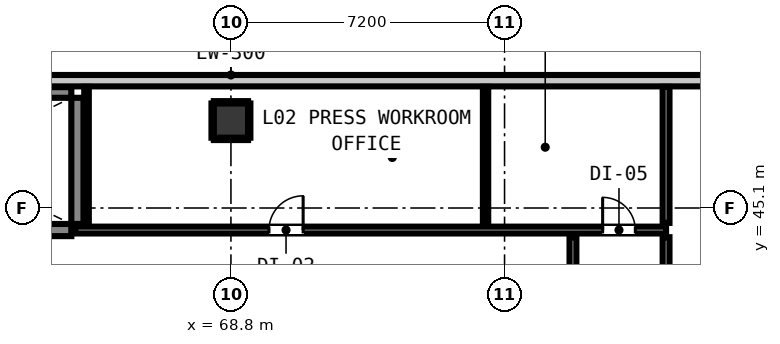
"""IFC4 building model, lengths in metres.
Left out: names, types, materials, properties, quantities, classifications, styles, units other than length and angle.
Written with IfcOpenShell. Run it as: python <this file> out.ifc"""

import sys

from ifc_helpers import new_model, si_unit, direction, frame, frame_2d, origin, origin_2d, place, context, subcontext, project, spatial, rectangle, circle, extrude, element, fill, save


model = new_model("IFC4")
c1 = context("Model", 3, precision=1e-05, world=origin(), true_north=direction((0.0, 1.0)))
c2 = subcontext(c1, "Body", "Model", "MODEL_VIEW")
j1 = project(units=[si_unit("LENGTHUNIT", "METRE"), si_unit("PLANEANGLEUNIT", "RADIAN")], contexts=[c1])
p1 = place(None, origin())
s1 = spatial("IfcSite", under=j1, at=p1, CompositionType="ELEMENT")
p2 = place(p1, origin())
s2 = spatial("IfcBuilding", under=s1, at=p2, CompositionType="ELEMENT")
p3 = place(p2, frame((0.0, 0.0, 9.4)))
s3 = spatial("IfcBuildingStorey", under=s2, at=p3, CompositionType="ELEMENT", Elevation=9.4)
p4 = place(p3, frame((64.76, 44.68, 0.0), z_axis=(0.0, 0.0, 1.0), x_axis=(0.0, 1.0, 0.0)))
e1 = element("IfcWall", 1, at=p4, inside=s3, PredefinedType="SHEAR", context=c2, shape_type="SweptSolid", body=[
    extrude(rectangle(XDim=3.32, YDim=0.32, at=frame_2d((1.66, 0.0))), origin(), (0.0, 0.0, 1.0), 4.2),
])
p5 = place(p3, frame((56.2, 48.14, 0.0), z_axis=(0.0, 0.0, 1.0), x_axis=(1.0, 0.0, 0.0)))
e2 = element("IfcWall", 2, at=p5, inside=s3, PredefinedType="SHEAR", context=c2, shape_type="SweptSolid", body=[
    extrude(rectangle(XDim=8.4, YDim=0.28, at=frame_2d((4.2, 0.0))), origin(), (0.0, 0.0, 1.0), 4.2),
])
p6 = place(p3, frame((56.2, 44.52, 0.0), z_axis=(0.0, 0.0, 1.0), x_axis=(1.0, 0.0, 0.0)))
e3 = element("IfcWall", 3, at=p6, inside=s3, PredefinedType="SHEAR", context=c2, shape_type="SweptSolid", body=[
    extrude(rectangle(XDim=8.4, YDim=0.32, at=frame_2d((4.2, 0.0))), origin(), (0.0, 0.0, 1.0), 4.2),
])
p7 = place(p6, frame((0.23, 0.0, 0.0)))
e4 = element("IfcOpeningElement", 4, at=p7, cuts=e3, PredefinedType="OPENING", context=c2, shape_type="SweptSolid", body=[
    extrude(rectangle(XDim=1.1, YDim=2.15, at=frame_2d((0.55, 1.075))), frame((0.0, 0.17, 0.0), z_axis=(0.0, -1.0, 0.0), x_axis=(1.0, 0.0, 0.0)), (0.0, 0.0, 1.0), 0.34),
])
p8 = place(p3, frame((68.8, 47.4, 0.0), z_axis=(0.0, 0.0, 1.0), x_axis=(1.0, 0.0, 0.0)))
e5 = element("IfcColumn", 5, at=p8, inside=s3, PredefinedType="COLUMN", context=c2, shape_type="SweptSolid", body=[
    extrude(circle(Radius=0.45, at=origin_2d()), origin(), (0.0, 0.0, 1.0), 4.2),
])
p9 = place(p3, frame((54.55, 48.45, 0.0), z_axis=(0.0, 0.0, 1.0), x_axis=(1.0, 0.0, 0.0)))
e6 = element("IfcWall", 6, at=p9, inside=s3, PredefinedType="STANDARD", context=c2, shape_type="SweptSolid", body=[
    extrude(rectangle(XDim=28.5, YDim=0.3, at=frame_2d((14.25, 0.0))), origin(), (0.0, 0.0, 1.0), 3.92),
])
p10 = place(p3, frame((64.7, 44.52, 0.0), z_axis=(0.0, 0.0, 1.0), x_axis=(1.0, 0.0, 0.0)))
e7 = element("IfcWall", 7, at=p10, inside=s3, PredefinedType="PARTITIONING", context=c2, shape_type="SweptSolid", body=[
    extrude(rectangle(XDim=15.55, YDim=0.18, at=frame_2d((7.775, 0.0))), origin(), (0.0, 0.0, 1.0), 3.92),
])
p11 = place(p10, frame((5.1, 0.0, 0.0)))
e8 = element("IfcOpeningElement", 8, at=p11, cuts=e7, PredefinedType="OPENING", context=c2, shape_type="SweptSolid", body=[
    extrude(rectangle(XDim=0.9, YDim=2.1, at=frame_2d((0.45, 1.05))), frame((0.0, 0.1, 0.0), z_axis=(0.0, -1.0, 0.0), x_axis=(1.0, 0.0, 0.0)), (0.0, 0.0, 1.0), 0.2),
])
p12 = place(p10, frame((13.881, 0.0, 0.0)))
e9 = element("IfcOpeningElement", 9, at=p12, cuts=e7, PredefinedType="OPENING", context=c2, shape_type="SweptSolid", body=[
    extrude(rectangle(XDim=0.86, YDim=2.02, at=frame_2d((0.43, 1.01))), frame((0.0, 0.1, 0.0), z_axis=(0.0, -1.0, 0.0), x_axis=(1.0, 0.0, 0.0)), (0.0, 0.0, 1.0), 0.2),
])
p13 = place(p3, frame((77.8, 40.788, 0.0), z_axis=(0.0, 0.0, 1.0), x_axis=(0.0, 1.0, 0.0)))
e10 = element("IfcWall", 10, at=p13, inside=s3, PredefinedType="PARTITIONING", context=c2, shape_type="SweptSolid", body=[
    extrude(rectangle(XDim=3.544, YDim=0.18, at=frame_2d((1.772, 0.0))), origin(), (0.0, 0.0, 1.0), 3.92),
])
p14 = place(p13, frame((1.048, 0.0, 0.0)))
e11 = element("IfcOpeningElement", 11, at=p14, cuts=e10, PredefinedType="OPENING", context=c2, shape_type="SweptSolid", body=[
    extrude(rectangle(XDim=1.4, YDim=2.15, at=frame_2d((0.7, 1.075))), frame((0.0, 0.1, 0.0), z_axis=(0.0, -1.0, 0.0), x_axis=(1.0, 0.0, 0.0)), (0.0, 0.0, 1.0), 0.2),
])
p15 = place(p3, frame((80.25, 18.645, 0.0), z_axis=(0.0, 0.0, 1.0), x_axis=(0.0, 1.0, 0.0)))
e12 = element("IfcWall", 12, at=p15, inside=s3, PredefinedType="PARTITIONING", context=c2, shape_type="SweptSolid", body=[
    extrude(rectangle(XDim=25.687, YDim=0.18, at=frame_2d((12.844, 0.0))), origin(), (0.0, 0.0, 1.0), 3.92),
])
p16 = place(p3, frame((80.25, 44.708, 0.0), z_axis=(0.0, 0.0, 1.0), x_axis=(0.0, 1.0, 0.0)))
e13 = element("IfcWall", 13, at=p16, inside=s3, PredefinedType="PARTITIONING", context=c2, shape_type="SweptSolid", body=[
    extrude(rectangle(XDim=3.58, YDim=0.18, at=frame_2d((1.79, 0.0))), origin(), (0.0, 0.0, 1.0), 3.92),
])
p17 = place(p3, frame((75.5, 44.688, 0.0), z_axis=(0.0, 0.0, 1.0), x_axis=(0.0, 1.0, 0.0)))
e14 = element("IfcWall", 14, at=p17, inside=s3, PredefinedType="PARTITIONING", context=c2, shape_type="SweptSolid", body=[
    extrude(rectangle(XDim=3.6, YDim=0.14, at=frame_2d((1.8, 0.0))), origin(), (0.0, 0.0, 1.0), 3.92),
])
p18 = place(p3, frame((65.0, 44.678, 0.0), z_axis=(0.0, 0.0, 1.0), x_axis=(0.0, 1.0, 0.0)))
e15 = element("IfcWall", 15, at=p18, inside=s3, PredefinedType="PARTITIONING", context=c2, shape_type="SweptSolid", body=[
    extrude(rectangle(XDim=3.61, YDim=0.12, at=frame_2d((1.805, 0.0))), origin(), (0.0, 0.0, 1.0), 3.92),
])
for number, where, z_axis, x_axis in (
    (16, (68.35, 46.918, 0.0), (0.0, 0.0, 1.0), (1.0, 0.0, 0.0)),
    (17, (68.35, 47.882, 0.0), (0.0, 0.0, 1.0), (1.0, 0.0, 0.0)),
):
    element("IfcWall", number, at=place(p3, frame(where, z_axis=z_axis, x_axis=x_axis)), inside=s3, PredefinedType="PARTITIONING", context=c2, shape_type="SweptSolid", body=[
        extrude(rectangle(XDim=0.9, YDim=0.06, at=frame_2d((0.45, 0.0))), origin(), (0.0, 0.0, 1.0), 1.45),
    ])
for number, where, z_axis, x_axis in (
    (18, (68.318, 46.95, 0.0), (0.0, 0.0, 1.0), (0.0, 1.0, 0.0)),
    (19, (69.282, 46.95, 0.0), (0.0, 0.0, 1.0), (0.0, 1.0, 0.0)),
):
    element("IfcWall", number, at=place(p3, frame(where, z_axis=z_axis, x_axis=x_axis)), inside=s3, PredefinedType="PARTITIONING", context=c2, shape_type="SweptSolid", body=[
        extrude(rectangle(XDim=0.9, YDim=0.06, at=frame_2d((0.45, 0.0))), origin(), (0.0, 0.0, 1.0), 1.45),
    ])
p19 = place(p11, origin())
e20 = element("IfcDoor", 20, at=p19, inside=s3, OperationType="SINGLE_SWING_RIGHT", PredefinedType="DOOR", context=c2, shape_type="SweptSolid", body=[
    extrude(rectangle(XDim=0.9, YDim=2.1, at=frame_2d((0.45, 1.05))), frame((0.0, 0.025, 0.0), z_axis=(0.0, -1.0, 0.0), x_axis=(1.0, 0.0, 0.0)), (0.0, 0.0, 1.0), 0.05),
])
fill(e8, e20)
p20 = place(p12, origin())
e21 = element("IfcDoor", 21, at=p20, inside=s3, OperationType="SINGLE_SWING_LEFT", PredefinedType="DOOR", context=c2, shape_type="SweptSolid", body=[
    extrude(rectangle(XDim=0.86, YDim=2.02, at=frame_2d((0.43, 1.01))), frame((0.0, 0.025, 0.0), z_axis=(0.0, -1.0, 0.0), x_axis=(1.0, 0.0, 0.0)), (0.0, 0.0, 1.0), 0.05),
])
fill(e9, e21)
save(model, sys.argv[1])
